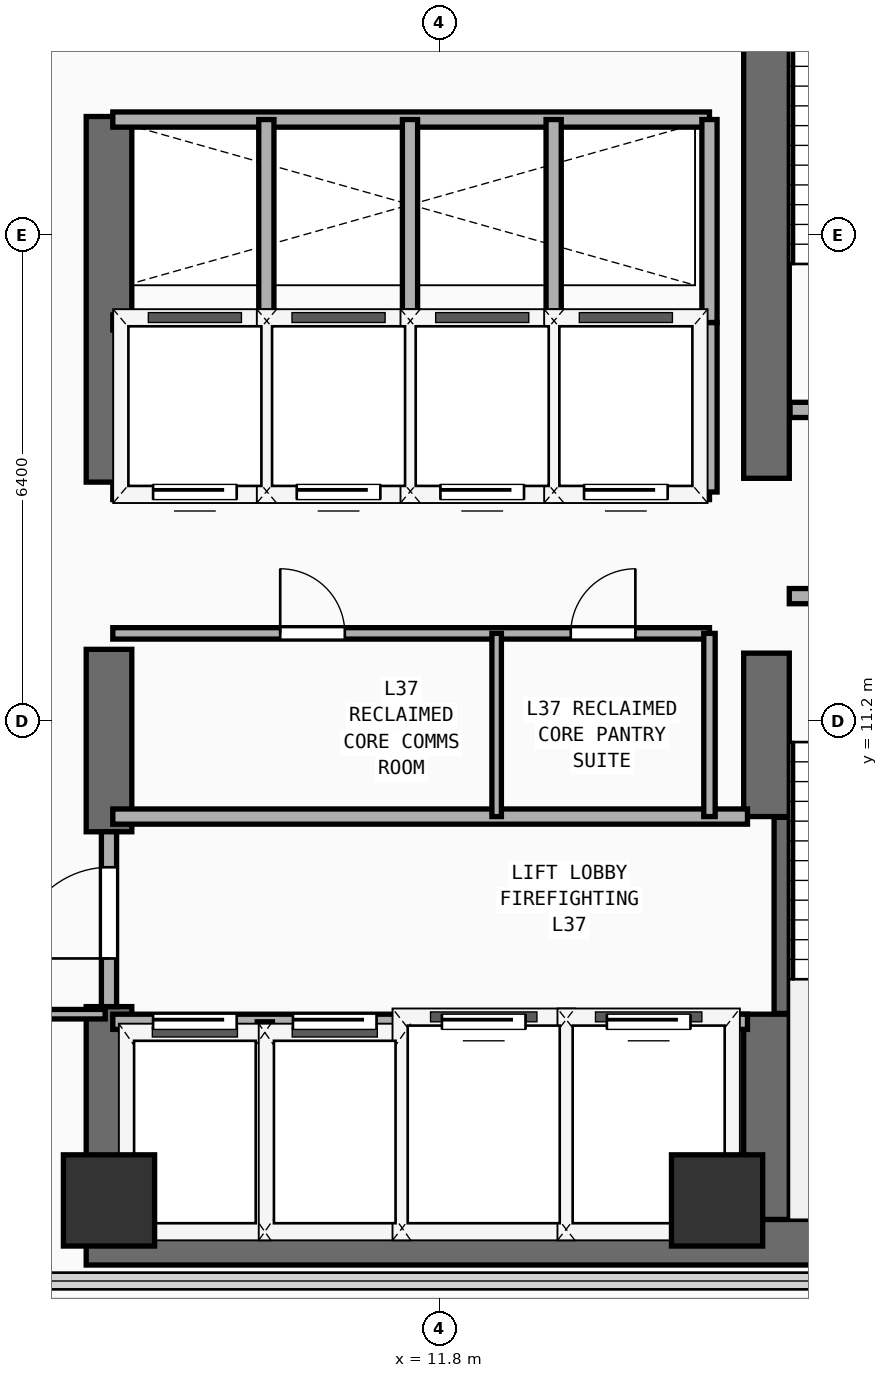
"""IFC4 building model, lengths in metres.
Left out: names, types, materials, properties, quantities, classifications, styles, units other than length and angle.
Written with IfcOpenShell. Run it as: python <this file> out.ifc"""

import sys

from ifc_helpers import new_model, si_unit, direction, frame, frame_2d, origin, origin_2d, place, context, subcontext, project, spatial, rectangle, extrude, element, fill, save


model = new_model("IFC4")
c1 = context("Model", 3, precision=1e-05, world=origin(), true_north=direction((0.0, 1.0)))
c2 = subcontext(c1, "Body", "Model", "MODEL_VIEW")
j1 = project(units=[si_unit("LENGTHUNIT", "METRE"), si_unit("PLANEANGLEUNIT", "RADIAN")], contexts=[c1])
p1 = place(None, origin())
s1 = spatial("IfcSite", under=j1, at=p1, CompositionType="ELEMENT")
p2 = place(p1, origin())
s2 = spatial("IfcBuilding", under=s1, at=p2, CompositionType="ELEMENT")
p3 = place(p2, frame((0.0, 0.0, 146.2)))
s3 = spatial("IfcBuildingStorey", under=s2, at=p3, CompositionType="ELEMENT", Elevation=146.2)
p4 = place(p3, frame((7.15, 4.35, 0.0), z_axis=(0.0, 0.0, 1.0), x_axis=(1.0, 0.0, 0.0)))
e1 = element("IfcWall", 1, at=p4, inside=s3, PredefinedType="SHEAR", context=c2, shape_type="SweptSolid", body=[
    extrude(rectangle(XDim=13.95, YDim=0.6, at=frame_2d((6.975, 0.0))), origin(), (0.0, 0.0, 1.0), 3.56),
])
p5 = place(p3, frame((7.45, 4.65, 0.0), z_axis=(0.0, 0.0, 1.0), x_axis=(0.0, 1.0, 0.0)))
e2 = element("IfcWall", 2, at=p5, inside=s3, PredefinedType="SHEAR", context=c2, shape_type="SweptSolid", body=[
    extrude(rectangle(XDim=2.8, YDim=0.6, at=frame_2d((1.4, 0.0))), origin(), (0.0, 0.0, 1.0), 3.56),
])
p6 = place(p3, frame((7.45, 9.75, 0.0), z_axis=(0.0, 0.0, 1.0), x_axis=(0.0, 1.0, 0.0)))
e3 = element("IfcWall", 3, at=p6, inside=s3, PredefinedType="SHEAR", context=c2, shape_type="SweptSolid", body=[
    extrude(rectangle(XDim=2.4, YDim=0.6, at=frame_2d((1.2, 0.0))), origin(), (0.0, 0.0, 1.0), 3.56),
])
p7 = place(p3, frame((7.45, 14.35, 0.0), z_axis=(0.0, 0.0, 1.0), x_axis=(0.0, 1.0, 0.0)))
e4 = element("IfcWall", 4, at=p7, inside=s3, PredefinedType="SHEAR", context=c2, shape_type="SweptSolid", body=[
    extrude(rectangle(XDim=4.81, YDim=0.6, at=frame_2d((2.405, 0.0))), origin(), (0.0, 0.0, 1.0), 3.56),
])
p8 = place(p3, frame((16.1, 4.65, 0.0), z_axis=(0.0, 0.0, 1.0), x_axis=(0.0, 1.0, 0.0)))
e5 = element("IfcWall", 5, at=p8, inside=s3, PredefinedType="SHEAR", context=c2, shape_type="SweptSolid", body=[
    extrude(rectangle(XDim=2.7, YDim=0.6, at=frame_2d((1.35, 0.0))), origin(), (0.0, 0.0, 1.0), 3.56),
])
p9 = place(p3, frame((16.1, 9.95, 0.0), z_axis=(0.0, 0.0, 1.0), x_axis=(0.0, 1.0, 0.0)))
e6 = element("IfcWall", 6, at=p9, inside=s3, PredefinedType="SHEAR", context=c2, shape_type="SweptSolid", body=[
    extrude(rectangle(XDim=2.15, YDim=0.6, at=frame_2d((1.075, 0.0))), origin(), (0.0, 0.0, 1.0), 3.56),
])
p10 = place(p3, frame((16.1, 14.4, 0.0), z_axis=(0.0, 0.0, 1.0), x_axis=(0.0, 1.0, 0.0)))
e7 = element("IfcWall", 7, at=p10, inside=s3, PredefinedType="SHEAR", context=c2, shape_type="SweptSolid", body=[
    extrude(rectangle(XDim=9.1, YDim=0.6, at=frame_2d((4.55, 0.0))), origin(), (0.0, 0.0, 1.0), 3.56),
])
for number, where, z_axis, x_axis in (
    (8, (7.45, 4.9, 0.0), (0.0, 0.0, 1.0), (1.0, 0.0, 0.0)),
    (9, (15.45, 4.9, 0.0), (0.0, 0.0, 1.0), (1.0, 0.0, 0.0)),
):
    element("IfcColumn", number, at=place(p3, frame(where, z_axis=z_axis, x_axis=x_axis)), inside=s3, PredefinedType="COLUMN", context=c2, shape_type="SweptSolid", body=[
        extrude(rectangle(XDim=1.2, YDim=1.2, at=origin_2d()), origin(), (0.0, 0.0, 1.0), 3.56),
    ])
p11 = place(p3, frame((16.3, 7.36, 0.0), z_axis=(0.0, 0.0, 1.0), x_axis=(0.0, 1.0, 0.0)))
e10 = element("IfcWall", 10, at=p11, inside=s3, PredefinedType="SHEAR", context=c2, shape_type="SweptSolid", body=[
    extrude(rectangle(XDim=2.58, YDim=0.2, at=frame_2d((1.29, 0.0))), origin(), (0.0, 0.0, 1.0), 3.56),
])
p12 = place(p3, frame((16.4, 12.85, 0.0), z_axis=(0.0, 0.0, 1.0), x_axis=(1.0, 0.0, 0.0)))
e11 = element("IfcWall", 11, at=p12, inside=s3, PredefinedType="PARTITIONING", context=c2, shape_type="SweptSolid", body=[
    extrude(rectangle(XDim=3.96, YDim=0.2, at=frame_2d((1.98, 0.0))), origin(), (0.0, 0.0, 1.0), 3.56),
])
p13 = place(p12, frame((1.304, 0.0, 0.0)))
e12 = element("IfcOpeningElement", 12, at=p13, cuts=e11, PredefinedType="OPENING", context=c2, shape_type="SweptSolid", body=[
    extrude(rectangle(XDim=1.1, YDim=2.2, at=frame_2d((0.55, 1.1))), frame((0.0, 0.11, 0.0), z_axis=(0.0, -1.0, 0.0), x_axis=(1.0, 0.0, 0.0)), (0.0, 0.0, 1.0), 0.22),
])
p14 = place(p3, frame((16.41, 15.3, 0.0), z_axis=(0.0, 0.0, 1.0), x_axis=(1.0, 0.0, 0.0)))
e13 = element("IfcWall", 13, at=p14, inside=s3, PredefinedType="PARTITIONING", context=c2, shape_type="SweptSolid", body=[
    extrude(rectangle(XDim=3.95, YDim=0.2, at=frame_2d((1.975, 0.0))), origin(), (0.0, 0.0, 1.0), 3.56),
])
p15 = place(p14, frame((1.294, 0.0, 0.0)))
e14 = element("IfcOpeningElement", 14, at=p15, cuts=e13, PredefinedType="OPENING", context=c2, shape_type="SweptSolid", body=[
    extrude(rectangle(XDim=1.1, YDim=2.2, at=frame_2d((0.55, 1.1))), frame((0.0, 0.11, 0.0), z_axis=(0.0, -1.0, 0.0), x_axis=(1.0, 0.0, 0.0)), (0.0, 0.0, 1.0), 0.22),
])
p16 = place(p3, frame((7.5, 7.25, 0.0), z_axis=(0.0, 0.0, 1.0), x_axis=(1.0, 0.0, 0.0)))
e15 = element("IfcWall", 15, at=p16, inside=s3, PredefinedType="PARTITIONING", context=c2, shape_type="SweptSolid", body=[
    extrude(rectangle(XDim=8.35, YDim=0.2, at=frame_2d((4.175, 0.0))), origin(), (0.0, 0.0, 1.0), 3.56),
])
p17 = place(p16, frame((0.53, 0.0, 0.0)))
e16 = element("IfcOpeningElement", 16, at=p17, cuts=e15, PredefinedType="OPENING", context=c2, shape_type="SweptSolid", body=[
    extrude(rectangle(XDim=1.1, YDim=2.2, at=frame_2d((0.55, 1.1))), frame((0.0, 0.11, 0.0), z_axis=(0.0, -1.0, 0.0), x_axis=(1.0, 0.0, 0.0)), (0.0, 0.0, 1.0), 0.22),
])
p18 = place(p16, frame((2.37, 0.0, 0.0)))
e17 = element("IfcOpeningElement", 17, at=p18, cuts=e15, PredefinedType="OPENING", context=c2, shape_type="SweptSolid", body=[
    extrude(rectangle(XDim=1.1, YDim=2.2, at=frame_2d((0.55, 1.1))), frame((0.0, 0.11, 0.0), z_axis=(0.0, -1.0, 0.0), x_axis=(1.0, 0.0, 0.0)), (0.0, 0.0, 1.0), 0.22),
])
p19 = place(p16, frame((4.33, 0.0, 0.0)))
e18 = element("IfcOpeningElement", 18, at=p19, cuts=e15, PredefinedType="OPENING", context=c2, shape_type="SweptSolid", body=[
    extrude(rectangle(XDim=1.1, YDim=2.2, at=frame_2d((0.55, 1.1))), frame((0.0, 0.11, 0.0), z_axis=(0.0, -1.0, 0.0), x_axis=(1.0, 0.0, 0.0)), (0.0, 0.0, 1.0), 0.22),
])
p20 = place(p16, frame((6.5, 0.0, 0.0)))
e19 = element("IfcOpeningElement", 19, at=p20, cuts=e15, PredefinedType="OPENING", context=c2, shape_type="SweptSolid", body=[
    extrude(rectangle(XDim=1.1, YDim=2.2, at=frame_2d((0.55, 1.1))), frame((0.0, 0.11, 0.0), z_axis=(0.0, -1.0, 0.0), x_axis=(1.0, 0.0, 0.0)), (0.0, 0.0, 1.0), 0.22),
])
p21 = place(p3, frame((7.5, 9.95, 0.0), z_axis=(0.0, 0.0, 1.0), x_axis=(1.0, 0.0, 0.0)))
e20 = element("IfcWall", 20, at=p21, inside=s3, PredefinedType="PARTITIONING", context=c2, shape_type="SweptSolid", body=[
    extrude(rectangle(XDim=8.35, YDim=0.2, at=frame_2d((4.175, 0.0))), origin(), (0.0, 0.0, 1.0), 3.56),
])
for number, where, z_axis, x_axis in (
    (21, (9.5, 4.45, 0.0), (0.0, 0.0, 1.0), (0.0, 1.0, 0.0)),
    (22, (11.36, 4.45, 0.0), (0.0, 0.0, 1.0), (0.0, 1.0, 0.0)),
    (23, (13.46, 4.45, 0.0), (0.0, 0.0, 1.0), (0.0, 1.0, 0.0)),
):
    element("IfcWall", number, at=place(p3, frame(where, z_axis=z_axis, x_axis=x_axis)), inside=s3, PredefinedType="PARTITIONING", context=c2, shape_type="SweptSolid", body=[
        extrude(rectangle(XDim=2.8, YDim=0.2, at=frame_2d((1.4, 0.0))), origin(), (0.0, 0.0, 1.0), 3.56),
    ])
p22 = place(p3, frame((7.45, 7.45, 0.0), z_axis=(0.0, 0.0, 1.0), x_axis=(0.0, 1.0, 0.0)))
e24 = element("IfcWall", 24, at=p22, inside=s3, PredefinedType="PARTITIONING", context=c2, shape_type="SweptSolid", body=[
    extrude(rectangle(XDim=2.3, YDim=0.2, at=frame_2d((1.15, 0.0))), origin(), (0.0, 0.0, 1.0), 2.54),
])
p23 = place(p22, frame((0.633, 0.0, 0.0)))
e25 = element("IfcOpeningElement", 25, at=p23, cuts=e24, PredefinedType="OPENING", context=c2, shape_type="SweptSolid", body=[
    extrude(rectangle(XDim=1.2, YDim=2.25, at=frame_2d((0.6, 1.125))), frame((0.0, 0.11, 0.0), z_axis=(0.0, -1.0, 0.0), x_axis=(1.0, 0.0, 0.0)), (0.0, 0.0, 1.0), 0.22),
])
p24 = place(p3, frame((7.5, 12.36, 0.0), z_axis=(0.0, 0.0, 1.0), x_axis=(1.0, 0.0, 0.0)))
e26 = element("IfcWall", 26, at=p24, inside=s3, PredefinedType="PARTITIONING", context=c2, shape_type="SweptSolid", body=[
    extrude(rectangle(XDim=7.85, YDim=0.15, at=frame_2d((3.925, 0.0))), origin(), (0.0, 0.0, 1.0), 3.56),
])
p25 = place(p24, frame((2.202, 0.0, 0.0)))
e27 = element("IfcOpeningElement", 27, at=p25, cuts=e26, PredefinedType="OPENING", context=c2, shape_type="SweptSolid", body=[
    extrude(rectangle(XDim=0.85, YDim=2.15, at=frame_2d((0.425, 1.075))), frame((0.0, 0.085, 0.0), z_axis=(0.0, -1.0, 0.0), x_axis=(1.0, 0.0, 0.0)), (0.0, 0.0, 1.0), 0.17),
])
p26 = place(p24, frame((6.025, 0.0, 0.0)))
e28 = element("IfcOpeningElement", 28, at=p26, cuts=e26, PredefinedType="OPENING", context=c2, shape_type="SweptSolid", body=[
    extrude(rectangle(XDim=0.85, YDim=2.15, at=frame_2d((0.425, 1.075))), frame((0.0, 0.085, 0.0), z_axis=(0.0, -1.0, 0.0), x_axis=(1.0, 0.0, 0.0)), (0.0, 0.0, 1.0), 0.17),
])
p27 = place(p3, frame((15.35, 9.95, 0.0), z_axis=(0.0, 0.0, 1.0), x_axis=(0.0, 1.0, 0.0)))
e29 = element("IfcWall", 29, at=p27, inside=s3, PredefinedType="PARTITIONING", context=c2, shape_type="SweptSolid", body=[
    extrude(rectangle(XDim=2.41, YDim=0.15, at=frame_2d((1.205, 0.0))), origin(), (0.0, 0.0, 1.0), 3.56),
])
p28 = place(p3, frame((12.55, 9.95, 0.0), z_axis=(0.0, 0.0, 1.0), x_axis=(0.0, 1.0, 0.0)))
e30 = element("IfcWall", 30, at=p28, inside=s3, PredefinedType="PARTITIONING", context=c2, shape_type="SweptSolid", body=[
    extrude(rectangle(XDim=2.41, YDim=0.125, at=frame_2d((1.205, 0.0))), origin(), (0.0, 0.0, 1.0), 3.56),
])
p29 = place(p3, frame((7.5, 14.22, 0.0), z_axis=(0.0, 0.0, 1.0), x_axis=(1.0, 0.0, 0.0)))
e31 = element("IfcWall", 31, at=p29, inside=s3, PredefinedType="PARTITIONING", context=c2, shape_type="SweptSolid", body=[
    extrude(rectangle(XDim=7.85, YDim=0.2, at=frame_2d((3.925, 0.0))), origin(), (0.0, 0.0, 1.0), 3.56),
])
p30 = place(p29, frame((0.53, 0.0, 0.0)))
e32 = element("IfcOpeningElement", 32, at=p30, cuts=e31, PredefinedType="OPENING", context=c2, shape_type="SweptSolid", body=[
    extrude(rectangle(XDim=1.1, YDim=2.2, at=frame_2d((0.55, 1.1))), frame((0.0, 0.11, 0.0), z_axis=(0.0, -1.0, 0.0), x_axis=(1.0, 0.0, 0.0)), (0.0, 0.0, 1.0), 0.22),
])
p31 = place(p29, frame((2.42, 0.0, 0.0)))
e33 = element("IfcOpeningElement", 33, at=p31, cuts=e31, PredefinedType="OPENING", context=c2, shape_type="SweptSolid", body=[
    extrude(rectangle(XDim=1.1, YDim=2.2, at=frame_2d((0.55, 1.1))), frame((0.0, 0.11, 0.0), z_axis=(0.0, -1.0, 0.0), x_axis=(1.0, 0.0, 0.0)), (0.0, 0.0, 1.0), 0.22),
])
p32 = place(p29, frame((4.31, 0.0, 0.0)))
e34 = element("IfcOpeningElement", 34, at=p32, cuts=e31, PredefinedType="OPENING", context=c2, shape_type="SweptSolid", body=[
    extrude(rectangle(XDim=1.1, YDim=2.2, at=frame_2d((0.55, 1.1))), frame((0.0, 0.11, 0.0), z_axis=(0.0, -1.0, 0.0), x_axis=(1.0, 0.0, 0.0)), (0.0, 0.0, 1.0), 0.22),
])
p33 = place(p29, frame((6.2, 0.0, 0.0)))
e35 = element("IfcOpeningElement", 35, at=p33, cuts=e31, PredefinedType="OPENING", context=c2, shape_type="SweptSolid", body=[
    extrude(rectangle(XDim=1.1, YDim=2.2, at=frame_2d((0.55, 1.1))), frame((0.0, 0.11, 0.0), z_axis=(0.0, -1.0, 0.0), x_axis=(1.0, 0.0, 0.0)), (0.0, 0.0, 1.0), 0.22),
])
p34 = place(p3, frame((7.5, 16.45, 0.0), z_axis=(0.0, 0.0, 1.0), x_axis=(1.0, 0.0, 0.0)))
e36 = element("IfcWall", 36, at=p34, inside=s3, PredefinedType="PARTITIONING", context=c2, shape_type="SweptSolid", body=[
    extrude(rectangle(XDim=7.85, YDim=0.2, at=frame_2d((3.925, 0.0))), origin(), (0.0, 0.0, 1.0), 3.56),
])
for number, where, z_axis, x_axis in (
    (37, (15.35, 14.22, 0.0), (0.0, 0.0, 1.0), (0.0, 1.0, 0.0)),
    (38, (9.52, 14.22, 0.0), (0.0, 0.0, 1.0), (0.0, 1.0, 0.0)),
    (39, (11.41, 14.22, 0.0), (0.0, 0.0, 1.0), (0.0, 1.0, 0.0)),
    (40, (13.3, 14.22, 0.0), (0.0, 0.0, 1.0), (0.0, 1.0, 0.0)),
):
    element("IfcWall", number, at=place(p3, frame(where, z_axis=z_axis, x_axis=x_axis)), inside=s3, PredefinedType="PARTITIONING", context=c2, shape_type="SweptSolid", body=[
        extrude(rectangle(XDim=2.23, YDim=0.2, at=frame_2d((1.115, 0.0))), origin(), (0.0, 0.0, 1.0), 3.56),
    ])
p35 = place(p3, frame((7.5, 19.12, 0.0), z_axis=(0.0, 0.0, 1.0), x_axis=(1.0, 0.0, 0.0)))
e41 = element("IfcWall", 41, at=p35, inside=s3, PredefinedType="PARTITIONING", context=c2, shape_type="SweptSolid", body=[
    extrude(rectangle(XDim=7.85, YDim=0.2, at=frame_2d((3.925, 0.0))), origin(), (0.0, 0.0, 1.0), 3.56),
])
for number, where, z_axis, x_axis in (
    (42, (15.35, 16.45, 0.0), (0.0, 0.0, 1.0), (0.0, 1.0, 0.0)),
    (43, (9.52, 16.45, 0.0), (0.0, 0.0, 1.0), (0.0, 1.0, 0.0)),
    (44, (11.41, 16.45, 0.0), (0.0, 0.0, 1.0), (0.0, 1.0, 0.0)),
    (45, (13.3, 16.45, 0.0), (0.0, 0.0, 1.0), (0.0, 1.0, 0.0)),
):
    element("IfcWall", number, at=place(p3, frame(where, z_axis=z_axis, x_axis=x_axis)), inside=s3, PredefinedType="PARTITIONING", context=c2, shape_type="SweptSolid", body=[
        extrude(rectangle(XDim=2.67, YDim=0.2, at=frame_2d((1.335, 0.0))), origin(), (0.0, 0.0, 1.0), 3.56),
    ])
p36 = place(p3, frame((4.04, 7.35, 0.0), z_axis=(0.0, 0.0, 1.0), x_axis=(1.0, 0.0, 0.0)))
e46 = element("IfcWall", 46, at=p36, inside=s3, PredefinedType="PARTITIONING", context=c2, shape_type="SweptSolid", body=[
    extrude(rectangle(XDim=3.36, YDim=0.125, at=frame_2d((1.68, 0.0))), origin(), (0.0, 0.0, 1.0), 3.56),
])
p37 = place(p36, frame((1.687, 0.0, 0.0)))
e47 = element("IfcOpeningElement", 47, at=p37, cuts=e46, PredefinedType="OPENING", context=c2, shape_type="SweptSolid", body=[
    extrude(rectangle(XDim=0.85, YDim=2.15, at=frame_2d((0.425, 1.075))), frame((0.0, 0.073, 0.0), z_axis=(0.0, -1.0, 0.0), x_axis=(1.0, 0.0, 0.0)), (0.0, 0.0, 1.0), 0.145),
])
p38 = place(p17, origin())
e48 = element("IfcDoor", 48, at=p38, inside=s3, OperationType="SLIDING_TO_LEFT", PredefinedType="DOOR", context=c2, shape_type="SweptSolid", body=[
    extrude(rectangle(XDim=1.1, YDim=2.2, at=frame_2d((0.55, 1.1))), frame((0.0, 0.025, 0.0), z_axis=(0.0, -1.0, 0.0), x_axis=(1.0, 0.0, 0.0)), (0.0, 0.0, 1.0), 0.05),
])
fill(e16, e48)
p39 = place(p18, origin())
e49 = element("IfcDoor", 49, at=p39, inside=s3, OperationType="SLIDING_TO_LEFT", PredefinedType="DOOR", context=c2, shape_type="SweptSolid", body=[
    extrude(rectangle(XDim=1.1, YDim=2.2, at=frame_2d((0.55, 1.1))), frame((0.0, 0.025, 0.0), z_axis=(0.0, -1.0, 0.0), x_axis=(1.0, 0.0, 0.0)), (0.0, 0.0, 1.0), 0.05),
])
fill(e17, e49)
p40 = place(p19, origin())
e50 = element("IfcDoor", 50, at=p40, inside=s3, OperationType="SLIDING_TO_LEFT", PredefinedType="DOOR", context=c2, shape_type="SweptSolid", body=[
    extrude(rectangle(XDim=1.1, YDim=2.2, at=frame_2d((0.55, 1.1))), frame((0.0, 0.025, 0.0), z_axis=(0.0, -1.0, 0.0), x_axis=(1.0, 0.0, 0.0)), (0.0, 0.0, 1.0), 0.05),
])
fill(e18, e50)
p41 = place(p20, origin())
e51 = element("IfcDoor", 51, at=p41, inside=s3, OperationType="SLIDING_TO_LEFT", PredefinedType="DOOR", context=c2, shape_type="SweptSolid", body=[
    extrude(rectangle(XDim=1.1, YDim=2.2, at=frame_2d((0.55, 1.1))), frame((0.0, 0.025, 0.0), z_axis=(0.0, -1.0, 0.0), x_axis=(1.0, 0.0, 0.0)), (0.0, 0.0, 1.0), 0.05),
])
fill(e19, e51)
p42 = place(p23, frame((1.2, 0.0, 0.0), z_axis=(0.0, 0.0, 1.0), x_axis=(-1.0, 0.0, 0.0)))
e52 = element("IfcDoor", 52, at=p42, inside=s3, OperationType="SINGLE_SWING_RIGHT", PredefinedType="DOOR", context=c2, shape_type="SweptSolid", body=[
    extrude(rectangle(XDim=1.2, YDim=2.25, at=frame_2d((0.6, 1.125))), frame((0.0, 0.025, 0.0), z_axis=(0.0, -1.0, 0.0), x_axis=(1.0, 0.0, 0.0)), (0.0, 0.0, 1.0), 0.05),
])
fill(e25, e52)
p43 = place(p25, origin())
e53 = element("IfcDoor", 53, at=p43, inside=s3, OperationType="SINGLE_SWING_LEFT", PredefinedType="DOOR", context=c2, shape_type="SweptSolid", body=[
    extrude(rectangle(XDim=0.85, YDim=2.15, at=frame_2d((0.425, 1.075))), frame((0.0, 0.025, 0.0), z_axis=(0.0, -1.0, 0.0), x_axis=(1.0, 0.0, 0.0)), (0.0, 0.0, 1.0), 0.05),
])
fill(e27, e53)
p44 = place(p26, origin())
e54 = element("IfcDoor", 54, at=p44, inside=s3, OperationType="SINGLE_SWING_RIGHT", PredefinedType="DOOR", context=c2, shape_type="SweptSolid", body=[
    extrude(rectangle(XDim=0.85, YDim=2.15, at=frame_2d((0.425, 1.075))), frame((0.0, 0.025, 0.0), z_axis=(0.0, -1.0, 0.0), x_axis=(1.0, 0.0, 0.0)), (0.0, 0.0, 1.0), 0.05),
])
fill(e28, e54)
p45 = place(p30, frame((1.1, 0.0, 0.0), z_axis=(0.0, 0.0, 1.0), x_axis=(-1.0, 0.0, 0.0)))
e55 = element("IfcDoor", 55, at=p45, inside=s3, OperationType="SLIDING_TO_LEFT", PredefinedType="DOOR", context=c2, shape_type="SweptSolid", body=[
    extrude(rectangle(XDim=1.1, YDim=2.2, at=frame_2d((0.55, 1.1))), frame((0.0, 0.025, 0.0), z_axis=(0.0, -1.0, 0.0), x_axis=(1.0, 0.0, 0.0)), (0.0, 0.0, 1.0), 0.05),
])
fill(e32, e55)
p46 = place(p31, frame((1.1, 0.0, 0.0), z_axis=(0.0, 0.0, 1.0), x_axis=(-1.0, 0.0, 0.0)))
e56 = element("IfcDoor", 56, at=p46, inside=s3, OperationType="SLIDING_TO_LEFT", PredefinedType="DOOR", context=c2, shape_type="SweptSolid", body=[
    extrude(rectangle(XDim=1.1, YDim=2.2, at=frame_2d((0.55, 1.1))), frame((0.0, 0.025, 0.0), z_axis=(0.0, -1.0, 0.0), x_axis=(1.0, 0.0, 0.0)), (0.0, 0.0, 1.0), 0.05),
])
fill(e33, e56)
p47 = place(p32, frame((1.1, 0.0, 0.0), z_axis=(0.0, 0.0, 1.0), x_axis=(-1.0, 0.0, 0.0)))
e57 = element("IfcDoor", 57, at=p47, inside=s3, OperationType="SLIDING_TO_LEFT", PredefinedType="DOOR", context=c2, shape_type="SweptSolid", body=[
    extrude(rectangle(XDim=1.1, YDim=2.2, at=frame_2d((0.55, 1.1))), frame((0.0, 0.025, 0.0), z_axis=(0.0, -1.0, 0.0), x_axis=(1.0, 0.0, 0.0)), (0.0, 0.0, 1.0), 0.05),
])
fill(e34, e57)
p48 = place(p33, frame((1.1, 0.0, 0.0), z_axis=(0.0, 0.0, 1.0), x_axis=(-1.0, 0.0, 0.0)))
e58 = element("IfcDoor", 58, at=p48, inside=s3, OperationType="SLIDING_TO_LEFT", PredefinedType="DOOR", context=c2, shape_type="SweptSolid", body=[
    extrude(rectangle(XDim=1.1, YDim=2.2, at=frame_2d((0.55, 1.1))), frame((0.0, 0.025, 0.0), z_axis=(0.0, -1.0, 0.0), x_axis=(1.0, 0.0, 0.0)), (0.0, 0.0, 1.0), 0.05),
])
fill(e35, e58)
save(model, sys.argv[1])
